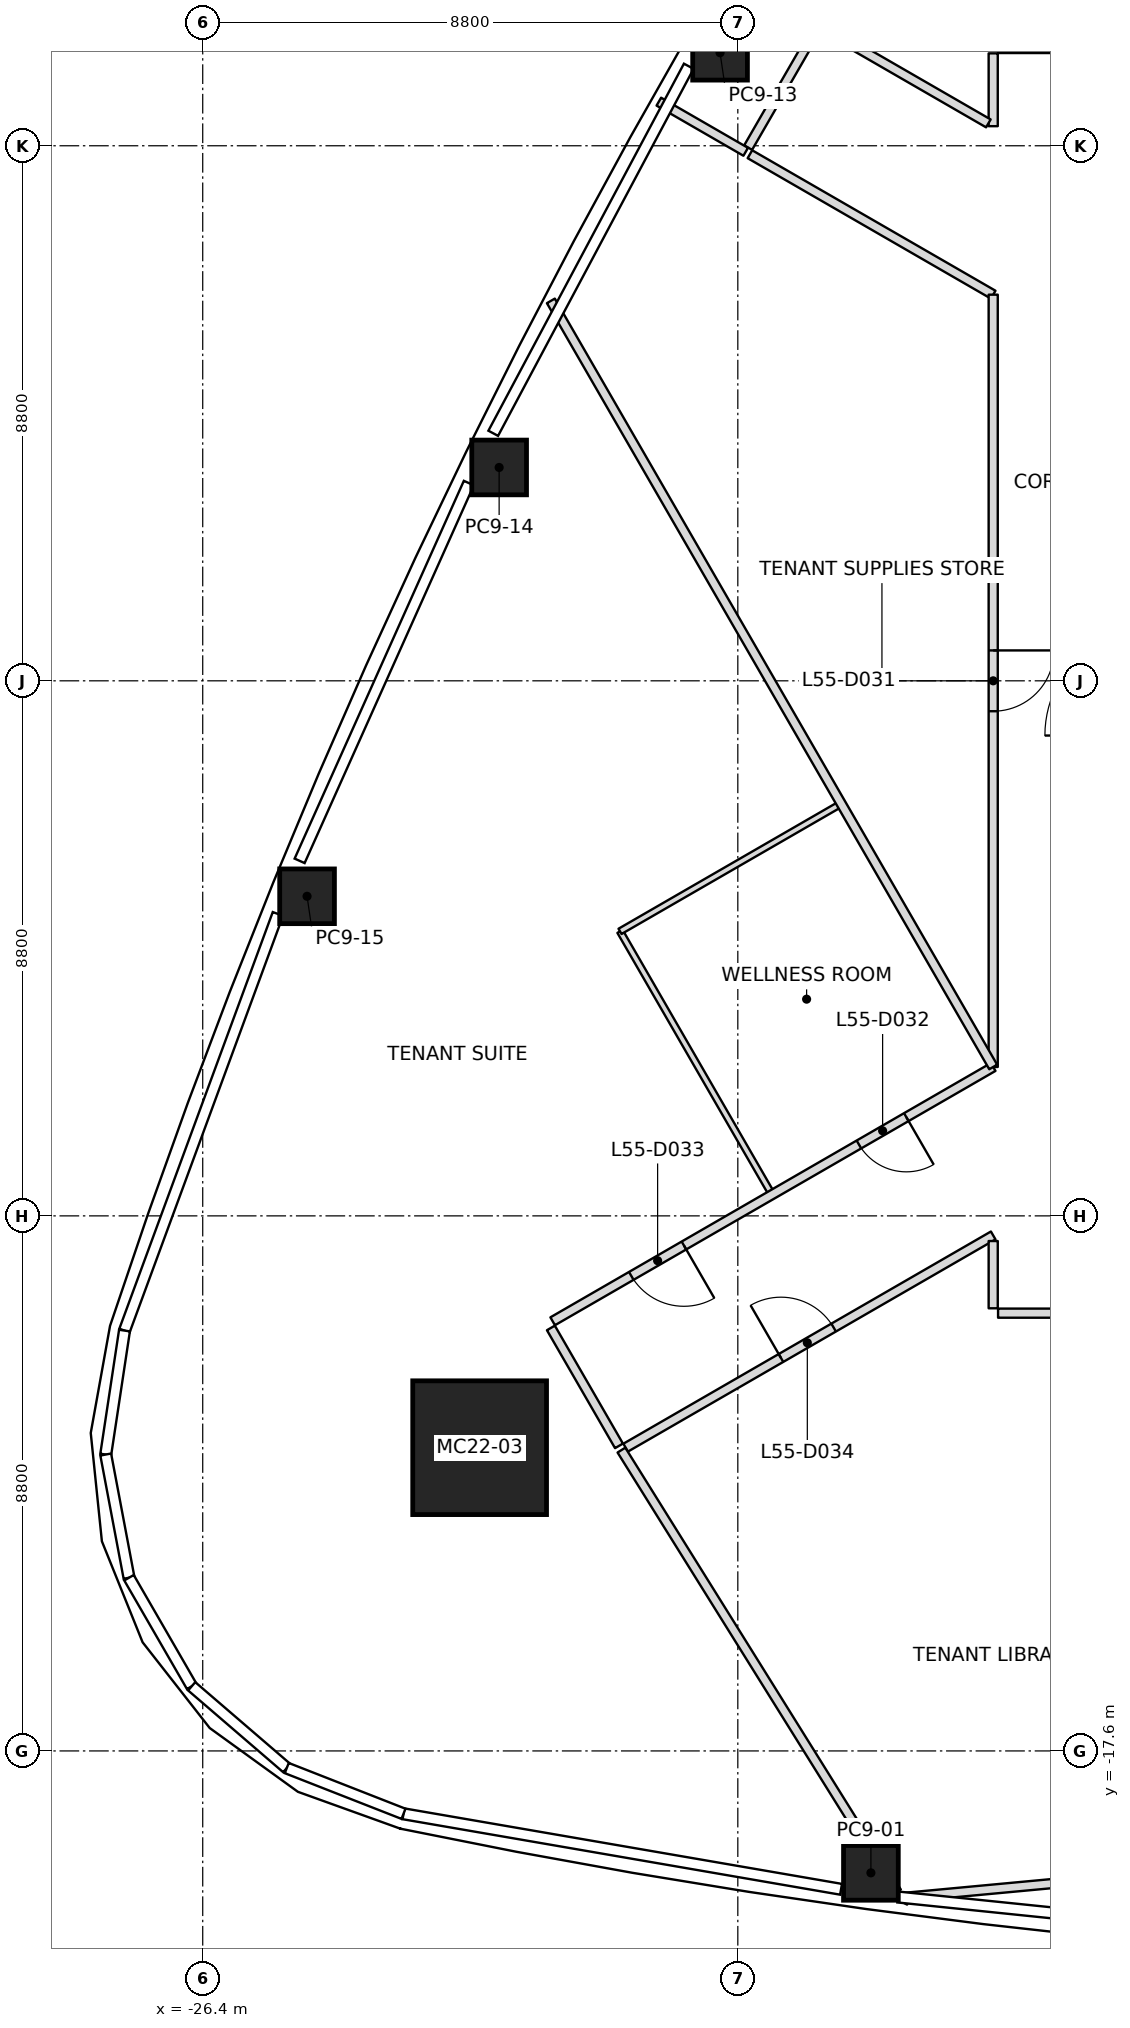
"""IFC4 building model, lengths in metres.
Left out: names, types, materials, properties, quantities, classifications, styles, units other than length and angle.
Written with IfcOpenShell. Run it as: python <this file> out.ifc"""

import sys

from ifc_helpers import new_model, si_unit, direction, frame, frame_2d, origin, origin_2d, place, context, subcontext, project, spatial, rectangle, extrude, element, fill, save


model = new_model("IFC4")
c1 = context("Model", 3, precision=1e-05, world=origin(), true_north=direction((0.0, 1.0)))
c2 = subcontext(c1, "Body", "Model", "MODEL_VIEW")
j1 = project(units=[si_unit("LENGTHUNIT", "METRE"), si_unit("PLANEANGLEUNIT", "RADIAN")], contexts=[c1])
p1 = place(None, origin())
s1 = spatial("IfcSite", under=j1, at=p1, CompositionType="ELEMENT")
p2 = place(p1, origin())
s2 = spatial("IfcBuilding", under=s1, at=p2, CompositionType="ELEMENT")
p3 = place(p2, frame((0.0, 0.0, 247.0)))
s3 = spatial("IfcBuildingStorey", under=s2, at=p3, CompositionType="ELEMENT", Elevation=247.0)
p4 = place(p3, frame((-21.846, -12.613, 0.0), z_axis=(0.027878633223, 0.016043939908, 0.999482553025), x_axis=(0.999611315367, -0.000447457036, -0.02787504211)))
e1 = element("IfcColumn", 1, at=p4, inside=s3, PredefinedType="COLUMN", context=c2, shape_type="SweptSolid", body=[
    extrude(rectangle(XDim=2.2, YDim=2.2, at=origin_2d()), origin(), (0.0, 0.0, 1.0), 4.002),
])
p5 = place(p3, frame((-15.411, -19.605, 0.0), z_axis=(0.017513460473, 0.010373826761, 0.999792809746), x_axis=(-0.990523512969, 0.136415635132, 0.015935643936)))
e2 = element("IfcColumn", 2, at=p5, inside=s3, PredefinedType="COLUMN", context=c2, shape_type="SweptSolid", body=[
    extrude(rectangle(XDim=0.9, YDim=0.9, at=origin_2d()), origin(), (0.0, 0.0, 1.0), 4.001),
])
p6 = place(p3, frame((-17.892, 10.33, 0.0), z_axis=(0.009887049298, -0.00573692984, 0.999934664812), x_axis=(0.499975560967, 0.866039512843, 2.5126546e-05)))
e3 = element("IfcColumn", 3, at=p6, inside=s3, PredefinedType="COLUMN", context=c2, shape_type="SweptSolid", body=[
    extrude(rectangle(XDim=0.9, YDim=0.9, at=origin_2d()), origin(), (0.0, 0.0, 1.0), 4.0),
])
p7 = place(p3, frame((-21.525, 3.509, 0.0), z_axis=(0.014097691364, 0.002013955909, 0.999898594398), x_axis=(0.439655652869, 0.898130716011, -0.008007737393)))
e4 = element("IfcColumn", 4, at=p7, inside=s3, PredefinedType="COLUMN", context=c2, shape_type="SweptSolid", body=[
    extrude(rectangle(XDim=0.9, YDim=0.9, at=origin_2d()), origin(), (0.0, 0.0, 1.0), 4.0),
])
p8 = place(p3, frame((-24.684, -3.544, 0.0), z_axis=(0.017757540332, 0.01000768596, 0.999792236409), x_axis=(0.37728836957, 0.925958127523, -0.01596972952)))
e5 = element("IfcColumn", 5, at=p8, inside=s3, PredefinedType="COLUMN", context=c2, shape_type="SweptSolid", body=[
    extrude(rectangle(XDim=0.9, YDim=0.9, at=origin_2d()), origin(), (0.0, 0.0, 1.0), 4.001),
])
p9 = place(p3, frame((-13.4, -6.351, 0.0), z_axis=(0.0, 0.0, 1.0), x_axis=(-0.500013935967, 0.8660173577, 0.0)))
e6 = element("IfcWall", 6, at=p9, inside=s3, PredefinedType="PARTITIONING", context=c2, shape_type="SweptSolid", body=[
    extrude(rectangle(XDim=14.549, YDim=0.15, at=frame_2d((7.274, 0.0))), origin(), (0.0, 0.0, 1.0), 3.234),
])
p10 = place(p3, frame((-19.514, -12.652, 0.0), z_axis=(0.0, 0.0, 1.0), x_axis=(0.529109501503, -0.848553554833, 0.0)))
e7 = element("IfcWall", 7, at=p10, inside=s3, PredefinedType="PARTITIONING", context=c2, shape_type="SweptSolid", body=[
    extrude(rectangle(XDim=8.564, YDim=0.15, at=frame_2d((4.282, 0.0))), origin(), (0.0, 0.0, 1.0), 3.45),
])
p11 = place(p3, frame((-17.47, 8.701, 0.0), z_axis=(0.0, 0.0, 1.0), x_axis=(-0.866003217194, 0.500038426333, 0.0)))
e8 = element("IfcWall", 8, at=p11, inside=s3, PredefinedType="PARTITIONING", context=c2, shape_type="SweptSolid", body=[
    extrude(rectangle(XDim=1.65, YDim=0.15, at=frame_2d((0.825, 0.0))), origin(), (0.0, 0.0, 1.0), 3.234),
])
p12 = place(p3, frame((-9.2, -19.48, 0.0), z_axis=(0.0, 0.0, 1.0), x_axis=(-0.995665878054, -0.093002469213, 0.0)))
e9 = element("IfcWall", 9, at=p12, inside=s3, PredefinedType="PARTITIONING", context=c2, shape_type="SweptSolid", body=[
    extrude(rectangle(XDim=5.657, YDim=0.15, at=frame_2d((2.829, 0.0))), origin(), (0.0, 0.0, 1.0), 3.234),
])
p13 = place(p3, frame((-14.883, -20.093, 0.0), z_axis=(0.0, 0.0, 1.0), x_axis=(0.467358739114, 0.884067762659, 0.0)))
e10 = element("IfcWall", 10, at=p13, inside=s3, PredefinedType="PARTITIONING", context=c2, shape_type="SweptSolid", body=[
    extrude(rectangle(XDim=0.106, YDim=0.15, at=frame_2d((0.053, 0.0))), origin(), (0.0, 0.0, 1.0), 3.45),
])
p14 = place(p3, frame((-20.674, -10.643, 0.0), z_axis=(0.0, 0.0, 1.0), x_axis=(0.49994888933, -0.866054910533, 0.0)))
e11 = element("IfcWall", 11, at=p14, inside=s3, PredefinedType="PARTITIONING", context=c2, shape_type="SweptSolid", body=[
    extrude(rectangle(XDim=2.24, YDim=0.15, at=frame_2d((1.12, 0.0))), origin(), (0.0, 0.0, 1.0), 3.233),
])
p15 = place(p3, frame((-13.4, -6.351, 0.0), z_axis=(0.0, 0.0, 1.0), x_axis=(-0.866023751359, -0.500002862074, 0.0)))
e12 = element("IfcWall", 12, at=p15, inside=s3, PredefinedType="PARTITIONING", context=c2, shape_type="SweptSolid", body=[
    extrude(rectangle(XDim=8.366, YDim=0.15, at=frame_2d((4.183, 0.0))), origin(), (0.0, 0.0, 1.0), 3.317),
])
p16 = place(p15, frame((1.65, 0.0, 0.0)))
e13 = element("IfcOpeningElement", 13, at=p16, cuts=e12, PredefinedType="OPENING", context=c2, shape_type="SweptSolid", body=[
    extrude(rectangle(XDim=0.9, YDim=2.1, at=frame_2d((0.45, 1.05))), frame((0.0, 0.075, 0.0), z_axis=(0.0, -1.0, 0.0), x_axis=(1.0, 0.0, 0.0)), (0.0, 0.0, 1.0), 0.15),
])
p17 = place(p15, frame((5.873, 0.0, 0.0)))
e14 = element("IfcOpeningElement", 14, at=p17, cuts=e12, PredefinedType="OPENING", context=c2, shape_type="SweptSolid", body=[
    extrude(rectangle(XDim=1.0, YDim=2.1, at=frame_2d((0.5, 1.05))), frame((0.0, 0.075, 0.0), z_axis=(0.0, -1.0, 0.0), x_axis=(1.0, 0.0, 0.0)), (0.0, 0.0, 1.0), 0.15),
])
p18 = place(p3, frame((-19.445, -12.612, 0.0), z_axis=(0.0, 0.0, 1.0), x_axis=(0.866028321769, 0.499994945868, 0.0)))
e15 = element("IfcWall", 15, at=p18, inside=s3, PredefinedType="PARTITIONING", context=c2, shape_type="SweptSolid", body=[
    extrude(rectangle(XDim=6.98, YDim=0.15, at=frame_2d((3.49, 0.0))), origin(), (0.0, 0.0, 1.0), 3.233),
])
p19 = place(p18, frame((2.95, 0.0, 0.0)))
e16 = element("IfcOpeningElement", 16, at=p19, cuts=e15, PredefinedType="OPENING", context=c2, shape_type="SweptSolid", body=[
    extrude(rectangle(XDim=1.0, YDim=2.1, at=frame_2d((0.5, 1.05))), frame((0.0, 0.075, 0.0), z_axis=(0.0, -1.0, 0.0), x_axis=(1.0, 0.0, 0.0)), (0.0, 0.0, 1.0), 0.15),
])
p20 = place(p3, frame((-13.4, -9.214, 0.0), z_axis=(0.0, 0.0, 1.0), x_axis=(0.0, -1.0, 0.0)))
e17 = element("IfcWall", 17, at=p20, inside=s3, PredefinedType="PARTITIONING", context=c2, shape_type="SweptSolid", body=[
    extrude(rectangle(XDim=1.106, YDim=0.15, at=frame_2d((0.553, 0.0))), origin(), (0.0, 0.0, 1.0), 3.233),
])
p21 = place(p3, frame((-16.31, 10.71, 0.0), z_axis=(0.0, 0.0, 1.0), x_axis=(-0.49994888933, -0.866054910533, 0.0)))
e18 = element("IfcWall", 18, at=p21, inside=s3, PredefinedType="PARTITIONING", context=c2, shape_type="SweptSolid", body=[
    extrude(rectangle(XDim=2.24, YDim=0.15, at=frame_2d((1.12, 0.0))), origin(), (0.0, 0.0, 1.0), 3.45),
])
p22 = place(p3, frame((-17.401, 8.661, 0.0), z_axis=(0.0, 0.0, 1.0), x_axis=(0.866016621662, -0.500015210774, 0.0)))
e19 = element("IfcWall", 19, at=p22, inside=s3, PredefinedType="PARTITIONING", context=c2, shape_type="SweptSolid", body=[
    extrude(rectangle(XDim=4.62, YDim=0.15, at=frame_2d((2.31, 0.0))), origin(), (0.0, 0.0, 1.0), 3.45),
])
p23 = place(p3, frame((-13.4, 6.351, 0.0), z_axis=(0.0, 0.0, 1.0), x_axis=(0.0, -1.0, 0.0)))
e20 = element("IfcWall", 20, at=p23, inside=s3, PredefinedType="PARTITIONING", context=c2, shape_type="SweptSolid", body=[
    extrude(rectangle(XDim=12.702, YDim=0.15, at=frame_2d((6.351, 0.0))), origin(), (0.0, 0.0, 1.0), 3.317),
])
p24 = place(p23, frame((5.851, 0.0, 0.0)))
e21 = element("IfcOpeningElement", 21, at=p24, cuts=e20, PredefinedType="OPENING", context=c2, shape_type="SweptSolid", body=[
    extrude(rectangle(XDim=1.0, YDim=2.1, at=frame_2d((0.5, 1.05))), frame((0.0, 0.075, 0.0), z_axis=(0.0, -1.0, 0.0), x_axis=(1.0, 0.0, 0.0)), (0.0, 0.0, 1.0), 0.15),
])
p25 = place(p3, frame((-13.4, 10.32, 0.0), z_axis=(0.0, 0.0, 1.0), x_axis=(0.0, -1.0, 0.0)))
e22 = element("IfcWall", 22, at=p25, inside=s3, PredefinedType="PARTITIONING", context=c2, shape_type="SweptSolid", body=[
    extrude(rectangle(XDim=1.198, YDim=0.15, at=frame_2d((0.599, 0.0))), origin(), (0.0, 0.0, 1.0), 3.45),
])
p26 = place(p3, frame((-13.479, 9.168, 0.0), z_axis=(0.0, 0.0, 1.0), x_axis=(-0.866035522163, 0.499982474044, 0.0)))
e23 = element("IfcWall", 23, at=p26, inside=s3, PredefinedType="PARTITIONING", context=c2, shape_type="SweptSolid", body=[
    extrude(rectangle(XDim=3.143, YDim=0.15, at=frame_2d((1.571, 0.0))), origin(), (0.0, 0.0, 1.0), 3.45),
])
p27 = place(p3, frame((-13.32, -10.4, 0.0), z_axis=(0.0, 0.0, 1.0), x_axis=(1.0, 0.0, 0.0)))
e24 = element("IfcWall", 24, at=p27, inside=s3, PredefinedType="PARTITIONING", context=c2, shape_type="SweptSolid", body=[
    extrude(rectangle(XDim=12.12, YDim=0.15, at=frame_2d((6.06, 0.0))), origin(), (0.0, 0.0, 1.0), 3.317),
])
p28 = place(p3, frame((-1.2, 10.4, 0.0), z_axis=(0.0, 0.0, 1.0), x_axis=(-1.0, 0.0, 0.0)))
e25 = element("IfcWall", 25, at=p28, inside=s3, PredefinedType="PARTITIONING", context=c2, shape_type="SweptSolid", body=[
    extrude(rectangle(XDim=12.12, YDim=0.15, at=frame_2d((6.06, 0.0))), origin(), (0.0, 0.0, 1.0), 3.317),
])
p29 = place(p28, frame((1.65, 0.0, 0.0)))
e26 = element("IfcOpeningElement", 26, at=p29, cuts=e25, PredefinedType="OPENING", context=c2, shape_type="SweptSolid", body=[
    extrude(rectangle(XDim=0.9, YDim=2.1, at=frame_2d((0.45, 1.05))), frame((0.0, 0.075, 0.0), z_axis=(0.0, -1.0, 0.0), x_axis=(1.0, 0.0, 0.0)), (0.0, 0.0, 1.0), 0.15),
])
p30 = place(p28, frame((7.75, 0.0, 0.0)))
e27 = element("IfcOpeningElement", 27, at=p30, cuts=e25, PredefinedType="OPENING", context=c2, shape_type="SweptSolid", body=[
    extrude(rectangle(XDim=1.0, YDim=2.1, at=frame_2d((0.5, 1.05))), frame((0.0, 0.075, 0.0), z_axis=(0.0, -1.0, 0.0), x_axis=(1.0, 0.0, 0.0)), (0.0, 0.0, 1.0), 0.15),
])
p31 = place(p3, frame((-17.052, -8.425, 0.0), z_axis=(0.0, 0.0, 1.0), x_axis=(-0.500011595943, 0.86601870876, 0.0)))
e28 = element("IfcWall", 28, at=p31, inside=s3, PredefinedType="PARTITIONING", context=c2, shape_type="SweptSolid", body=[
    extrude(rectangle(XDim=4.97, YDim=0.1, at=frame_2d((2.485, 0.0))), origin(), (0.0, 0.0, 1.0), 3.317),
])
p32 = place(p3, frame((-19.537, -4.121, 0.0), z_axis=(0.0, 0.0, 1.0), x_axis=(0.866029591389, 0.499992746786, 0.0)))
e29 = element("IfcWall", 29, at=p32, inside=s3, PredefinedType="PARTITIONING", context=c2, shape_type="SweptSolid", body=[
    extrude(rectangle(XDim=4.17, YDim=0.1, at=frame_2d((2.085, 0.0))), origin(), (0.0, 0.0, 1.0), 3.317),
])
p33 = place(p24, origin())
e30 = element("IfcDoor", 30, at=p33, inside=s3, OperationType="SINGLE_SWING_RIGHT", PredefinedType="DOOR", context=c2, shape_type="SweptSolid", body=[
    extrude(rectangle(XDim=1.0, YDim=2.1, at=frame_2d((0.5, 1.05))), frame((0.0, 0.025, 0.0), z_axis=(0.0, -1.0, 0.0), x_axis=(1.0, 0.0, 0.0)), (0.0, 0.0, 1.0), 0.05),
])
fill(e21, e30)
p34 = place(p16, origin())
e31 = element("IfcDoor", 31, at=p34, inside=s3, OperationType="SINGLE_SWING_RIGHT", PredefinedType="DOOR", context=c2, shape_type="SweptSolid", body=[
    extrude(rectangle(XDim=0.9, YDim=2.1, at=frame_2d((0.45, 1.05))), frame((0.0, 0.025, 0.0), z_axis=(0.0, -1.0, 0.0), x_axis=(1.0, 0.0, 0.0)), (0.0, 0.0, 1.0), 0.05),
])
fill(e13, e31)
p35 = place(p17, origin())
e32 = element("IfcDoor", 32, at=p35, inside=s3, OperationType="SINGLE_SWING_LEFT", PredefinedType="DOOR", context=c2, shape_type="SweptSolid", body=[
    extrude(rectangle(XDim=1.0, YDim=2.1, at=frame_2d((0.5, 1.05))), frame((0.0, 0.025, 0.0), z_axis=(0.0, -1.0, 0.0), x_axis=(1.0, 0.0, 0.0)), (0.0, 0.0, 1.0), 0.05),
])
fill(e14, e32)
p36 = place(p19, origin())
e33 = element("IfcDoor", 33, at=p36, inside=s3, OperationType="SINGLE_SWING_LEFT", PredefinedType="DOOR", context=c2, shape_type="SweptSolid", body=[
    extrude(rectangle(XDim=1.0, YDim=2.1, at=frame_2d((0.5, 1.05))), frame((0.0, 0.025, 0.0), z_axis=(0.0, -1.0, 0.0), x_axis=(1.0, 0.0, 0.0)), (0.0, 0.0, 1.0), 0.05),
])
fill(e16, e33)
save(model, sys.argv[1])
